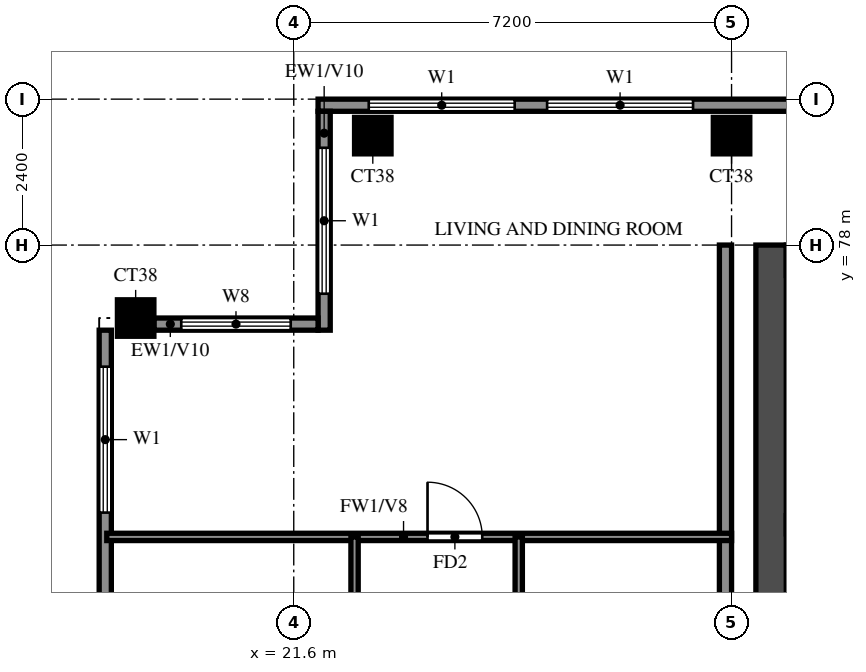
"""IFC4 building model, lengths in metres.
Left out: names, types, materials, properties, quantities, classifications, styles, units other than length and angle.
Written with IfcOpenShell. Run it as: python <this file> out.ifc"""

import sys

from ifc_helpers import new_model, si_unit, direction, frame, frame_2d, origin, origin_2d, place, context, subcontext, project, spatial, rectangle, extrude, source, transform, mapped, element, fill, save


model = new_model("IFC4")
c1 = context("Model", 3, precision=1e-05, world=origin(), true_north=direction((0.0, 1.0)))
c2 = subcontext(c1, "Body", "Model", "MODEL_VIEW")
j1 = project(units=[si_unit("LENGTHUNIT", "METRE"), si_unit("PLANEANGLEUNIT", "RADIAN")], contexts=[c1])
p1 = place(None, origin())
s1 = spatial("IfcSite", under=j1, at=p1, CompositionType="ELEMENT")
p2 = place(p1, origin())
s2 = spatial("IfcBuilding", under=s1, at=p2, CompositionType="ELEMENT")
p3 = place(p2, frame((0.0, 0.0, 267.5)))
s3 = spatial("IfcBuildingStorey", under=s2, at=p3, CompositionType="ELEMENT", Elevation=267.5)
m1 = source(origin(), c2, "Body", "SweptSolid", [
    extrude(rectangle(XDim=0.6, YDim=0.6, at=origin_2d()), origin(), (0.0, 0.0, 1.0), 3.099),
])
for number, where, z_axis, x_axis in (
    (1, (19.0, 76.8, 0.0), (0.0, 0.0, 1.0), (1.0, 0.0, 0.0)),
    (2, (22.9, 79.8, 0.0), (0.0, 0.0, 1.0), (1.0, 0.0, 0.0)),
    (3, (28.8, 79.8, 0.0), (0.0, 0.0, 1.0), (1.0, 0.0, 0.0)),
):
    element("IfcColumn", number, at=place(p3, frame(where, z_axis=z_axis, x_axis=x_axis)), inside=s3, PredefinedType="COLUMN", context=c2, shape_type="MappedRepresentation", body=[
        mapped(m1, transform((0.0, 0.0, 0.0))),
    ])
p4 = place(p3, frame((29.45, 66.15, 0.0), z_axis=(0.0, 0.0, 1.0), x_axis=(0.0, 1.0, 0.0)))
e4 = element("IfcWall", 4, at=p4, inside=s3, PredefinedType="SHEAR", context=c2, shape_type="SweptSolid", body=[
    extrude(rectangle(XDim=11.85, YDim=0.5, at=frame_2d((5.925, 0.0))), origin(), (0.0, 0.0, 1.0), 3.099),
])
p5 = place(p3, frame((78.6, 80.3, 0.0), z_axis=(0.0, 0.0, 1.0), x_axis=(-1.0, 0.0, 0.0)))
e5 = element("IfcWall", 5, at=p5, inside=s3, PredefinedType="SOLIDWALL", context=c2, shape_type="SweptSolid", body=[
    extrude(rectangle(XDim=56.6, YDim=0.2, at=frame_2d((28.3, 0.0))), origin(), (0.0, 0.0, 1.0), 3.099),
])
p6 = place(p5, frame((3.9, 0.0, 0.0)))
e6 = element("IfcOpeningElement", 6, at=p6, cuts=e5, PredefinedType="OPENING", context=c2, shape_type="SweptSolid", body=[
    extrude(rectangle(XDim=1.8, YDim=2.4, at=frame_2d((0.9, 1.2))), frame((0.0, 0.11, 0.0), z_axis=(0.0, -1.0, 0.0), x_axis=(1.0, 0.0, 0.0)), (0.0, 0.0, 1.0), 0.22),
])
p7 = place(p5, frame((50.433, 0.0, 0.6)))
e7 = element("IfcOpeningElement", 7, at=p7, cuts=e5, PredefinedType="OPENING", context=c2, shape_type="SweptSolid", body=[
    extrude(rectangle(XDim=2.4, YDim=2.4, at=frame_2d((1.2, 1.2))), frame((0.0, 0.11, 0.0), z_axis=(0.0, -1.0, 0.0), x_axis=(1.0, 0.0, 0.0)), (0.0, 0.0, 1.0), 0.22),
])
p8 = place(p5, frame((53.367, 0.0, 0.6)))
e8 = element("IfcOpeningElement", 8, at=p8, cuts=e5, PredefinedType="OPENING", context=c2, shape_type="SweptSolid", body=[
    extrude(rectangle(XDim=2.4, YDim=2.4, at=frame_2d((1.2, 1.2))), frame((0.0, 0.11, 0.0), z_axis=(0.0, -1.0, 0.0), x_axis=(1.0, 0.0, 0.0)), (0.0, 0.0, 1.0), 0.22),
])
p9 = place(p5, frame((0.4, 0.0, 0.6)))
e9 = element("IfcOpeningElement", 9, at=p9, cuts=e5, PredefinedType="OPENING", context=c2, shape_type="SweptSolid", body=[
    extrude(rectangle(XDim=1.2, YDim=2.4, at=frame_2d((0.6, 1.2))), frame((0.0, 0.11, 0.0), z_axis=(0.0, -1.0, 0.0), x_axis=(1.0, 0.0, 0.0)), (0.0, 0.0, 1.0), 0.22),
])
p10 = place(p5, frame((2.55, 0.0, 0.6)))
e10 = element("IfcOpeningElement", 10, at=p10, cuts=e5, PredefinedType="OPENING", context=c2, shape_type="SweptSolid", body=[
    extrude(rectangle(XDim=0.9, YDim=2.4, at=frame_2d((0.45, 1.2))), frame((0.0, 0.11, 0.0), z_axis=(0.0, -1.0, 0.0), x_axis=(1.0, 0.0, 0.0)), (0.0, 0.0, 1.0), 0.22),
])
p11 = place(p3, frame((22.1, 80.2, 0.0), z_axis=(0.0, 0.0, 1.0), x_axis=(0.0, -1.0, 0.0)))
e11 = element("IfcWall", 11, at=p11, inside=s3, PredefinedType="SOLIDWALL", context=c2, shape_type="SweptSolid", body=[
    extrude(rectangle(XDim=3.6, YDim=0.2, at=frame_2d((1.8, 0.0))), origin(), (0.0, 0.0, 1.0), 3.099),
])
p12 = place(p11, frame((0.6, 0.0, 0.6)))
e12 = element("IfcOpeningElement", 12, at=p12, cuts=e11, PredefinedType="OPENING", context=c2, shape_type="SweptSolid", body=[
    extrude(rectangle(XDim=2.4, YDim=2.4, at=frame_2d((1.2, 1.2))), frame((0.0, 0.11, 0.0), z_axis=(0.0, -1.0, 0.0), x_axis=(1.0, 0.0, 0.0)), (0.0, 0.0, 1.0), 0.22),
])
p13 = place(p3, frame((22.0, 76.7, 0.0), z_axis=(0.0, 0.0, 1.0), x_axis=(-1.0, 0.0, 0.0)))
e13 = element("IfcWall", 13, at=p13, inside=s3, PredefinedType="SOLIDWALL", context=c2, shape_type="SweptSolid", body=[
    extrude(rectangle(XDim=2.7, YDim=0.2, at=frame_2d((1.35, 0.0))), origin(), (0.0, 0.0, 1.0), 3.099),
])
p14 = place(p13, frame((0.45, 0.0, 0.6)))
e14 = element("IfcOpeningElement", 14, at=p14, cuts=e13, PredefinedType="OPENING", context=c2, shape_type="SweptSolid", body=[
    extrude(rectangle(XDim=1.8, YDim=2.4, at=frame_2d((0.9, 1.2))), frame((0.0, 0.11, 0.0), z_axis=(0.0, -1.0, 0.0), x_axis=(1.0, 0.0, 0.0)), (0.0, 0.0, 1.0), 0.22),
])
p15 = place(p3, frame((18.5, 76.6, 0.0), z_axis=(0.0, 0.0, 1.0), x_axis=(0.0, -1.0, 0.0)))
e15 = element("IfcWall", 15, at=p15, inside=s3, PredefinedType="SOLIDWALL", context=c2, shape_type="SweptSolid", body=[
    extrude(rectangle(XDim=14.2, YDim=0.2, at=frame_2d((7.1, 0.0))), origin(), (0.0, 0.0, 1.0), 3.099),
])
p16 = place(p15, frame((11.1, 0.0, 0.6)))
e16 = element("IfcOpeningElement", 16, at=p16, cuts=e15, PredefinedType="OPENING", context=c2, shape_type="SweptSolid", body=[
    extrude(rectangle(XDim=2.4, YDim=2.4, at=frame_2d((1.2, 1.2))), frame((0.0, 0.11, 0.0), z_axis=(0.0, -1.0, 0.0), x_axis=(1.0, 0.0, 0.0)), (0.0, 0.0, 1.0), 0.22),
])
p17 = place(p15, frame((7.6, 0.0, 0.6)))
e17 = element("IfcOpeningElement", 17, at=p17, cuts=e15, PredefinedType="OPENING", context=c2, shape_type="SweptSolid", body=[
    extrude(rectangle(XDim=2.4, YDim=2.4, at=frame_2d((1.2, 1.2))), frame((0.0, 0.11, 0.0), z_axis=(0.0, -1.0, 0.0), x_axis=(1.0, 0.0, 0.0)), (0.0, 0.0, 1.0), 0.22),
])
p18 = place(p15, frame((4.75, 0.0, 1.5)))
e18 = element("IfcOpeningElement", 18, at=p18, cuts=e15, PredefinedType="OPENING", context=c2, shape_type="SweptSolid", body=[
    extrude(rectangle(XDim=0.9, YDim=0.9, at=frame_2d((0.45, 0.45))), frame((0.0, 0.11, 0.0), z_axis=(0.0, -1.0, 0.0), x_axis=(1.0, 0.0, 0.0)), (0.0, 0.0, 1.0), 0.22),
])
p19 = place(p15, frame((0.6, 0.0, 0.6)))
e19 = element("IfcOpeningElement", 19, at=p19, cuts=e15, PredefinedType="OPENING", context=c2, shape_type="SweptSolid", body=[
    extrude(rectangle(XDim=2.4, YDim=2.4, at=frame_2d((1.2, 1.2))), frame((0.0, 0.11, 0.0), z_axis=(0.0, -1.0, 0.0), x_axis=(1.0, 0.0, 0.0)), (0.0, 0.0, 1.0), 0.22),
])
p20 = place(p3, frame((28.7, 62.4, 0.0), z_axis=(0.0, 0.0, 1.0), x_axis=(0.0, 1.0, 0.0)))
e20 = element("IfcWall", 20, at=p20, inside=s3, PredefinedType="SOLIDWALL", context=c2, shape_type="SweptSolid", body=[
    extrude(rectangle(XDim=15.6, YDim=0.2, at=frame_2d((7.8, 0.0))), origin(), (0.0, 0.0, 1.0), 3.099),
])
p21 = place(p3, frame((18.525, 73.2, 0.0), z_axis=(0.0, 0.0, 1.0), x_axis=(1.0, 0.0, 0.0)))
e21 = element("IfcWall", 21, at=p21, inside=s3, PredefinedType="PARTITIONING", context=c2, shape_type="SweptSolid", body=[
    extrude(rectangle(XDim=10.275, YDim=0.12, at=frame_2d((5.138, 0.0))), origin(), (0.0, 0.0, 1.0), 3.099),
])
p22 = place(p21, frame((5.275, 0.0, 0.0)))
e22 = element("IfcOpeningElement", 22, at=p22, cuts=e21, PredefinedType="OPENING", context=c2, shape_type="SweptSolid", body=[
    extrude(rectangle(XDim=0.9, YDim=2.1, at=frame_2d((0.45, 1.05))), frame((0.0, 0.07, 0.0), z_axis=(0.0, -1.0, 0.0), x_axis=(1.0, 0.0, 0.0)), (0.0, 0.0, 1.0), 0.14),
])
p23 = place(p3, frame((22.6, 69.6, 0.0), z_axis=(0.0, 0.0, 1.0), x_axis=(0.0, 1.0, 0.0)))
e23 = element("IfcWall", 23, at=p23, inside=s3, PredefinedType="PARTITIONING", context=c2, shape_type="SweptSolid", body=[
    extrude(rectangle(XDim=3.6, YDim=0.12, at=frame_2d((1.8, 0.0))), origin(), (0.0, 0.0, 1.0), 3.099),
])
p24 = place(p3, frame((25.3, 64.8, 0.0), z_axis=(0.0, 0.0, 1.0), x_axis=(0.0, 1.0, 0.0)))
e24 = element("IfcWall", 24, at=p24, inside=s3, PredefinedType="PARTITIONING", context=c2, shape_type="SweptSolid", body=[
    extrude(rectangle(XDim=8.4, YDim=0.12, at=frame_2d((4.2, 0.0))), origin(), (0.0, 0.0, 1.0), 3.099),
])
p25 = place(p24, frame((5.4, 0.0, 0.0)))
e25 = element("IfcOpeningElement", 25, at=p25, cuts=e24, PredefinedType="OPENING", context=c2, shape_type="SweptSolid", body=[
    extrude(rectangle(XDim=0.9, YDim=2.1, at=frame_2d((0.45, 1.05))), frame((0.0, 0.07, 0.0), z_axis=(0.0, -1.0, 0.0), x_axis=(1.0, 0.0, 0.0)), (0.0, 0.0, 1.0), 0.14),
])
p26 = place(p7, origin())
e26 = element("IfcWindow", 26, at=p26, inside=s3, PartitioningType="DOUBLE_PANEL_VERTICAL", PredefinedType="WINDOW", context=c2, shape_type="SweptSolid", body=[
    extrude(rectangle(XDim=2.4, YDim=2.4, at=frame_2d((1.2, 1.2))), frame((0.0, 0.03, 0.0), z_axis=(0.0, -1.0, 0.0), x_axis=(1.0, 0.0, 0.0)), (0.0, 0.0, 1.0), 0.06),
])
fill(e7, e26)
p27 = place(p8, origin())
e27 = element("IfcWindow", 27, at=p27, inside=s3, PartitioningType="DOUBLE_PANEL_VERTICAL", PredefinedType="WINDOW", context=c2, shape_type="SweptSolid", body=[
    extrude(rectangle(XDim=2.4, YDim=2.4, at=frame_2d((1.2, 1.2))), frame((0.0, 0.03, 0.0), z_axis=(0.0, -1.0, 0.0), x_axis=(1.0, 0.0, 0.0)), (0.0, 0.0, 1.0), 0.06),
])
fill(e8, e27)
p28 = place(p12, origin())
e28 = element("IfcWindow", 28, at=p28, inside=s3, PartitioningType="DOUBLE_PANEL_VERTICAL", PredefinedType="WINDOW", context=c2, shape_type="SweptSolid", body=[
    extrude(rectangle(XDim=2.4, YDim=2.4, at=frame_2d((1.2, 1.2))), frame((0.0, 0.03, 0.0), z_axis=(0.0, -1.0, 0.0), x_axis=(1.0, 0.0, 0.0)), (0.0, 0.0, 1.0), 0.06),
])
fill(e12, e28)
p29 = place(p14, origin())
e29 = element("IfcWindow", 29, at=p29, inside=s3, PartitioningType="DOUBLE_PANEL_VERTICAL", PredefinedType="WINDOW", context=c2, shape_type="SweptSolid", body=[
    extrude(rectangle(XDim=1.8, YDim=2.4, at=frame_2d((0.9, 1.2))), frame((0.0, 0.03, 0.0), z_axis=(0.0, -1.0, 0.0), x_axis=(1.0, 0.0, 0.0)), (0.0, 0.0, 1.0), 0.06),
])
fill(e14, e29)
p30 = place(p19, origin())
e30 = element("IfcWindow", 30, at=p30, inside=s3, PartitioningType="DOUBLE_PANEL_VERTICAL", PredefinedType="WINDOW", context=c2, shape_type="SweptSolid", body=[
    extrude(rectangle(XDim=2.4, YDim=2.4, at=frame_2d((1.2, 1.2))), frame((0.0, 0.03, 0.0), z_axis=(0.0, -1.0, 0.0), x_axis=(1.0, 0.0, 0.0)), (0.0, 0.0, 1.0), 0.06),
])
fill(e19, e30)
p31 = place(p22, origin())
e31 = element("IfcDoor", 31, at=p31, inside=s3, OperationType="SINGLE_SWING_LEFT", PredefinedType="DOOR", context=c2, shape_type="SweptSolid", body=[
    extrude(rectangle(XDim=0.9, YDim=2.1, at=frame_2d((0.45, 1.05))), frame((0.0, 0.025, 0.0), z_axis=(0.0, -1.0, 0.0), x_axis=(1.0, 0.0, 0.0)), (0.0, 0.0, 1.0), 0.05),
])
fill(e22, e31)
save(model, sys.argv[1])
